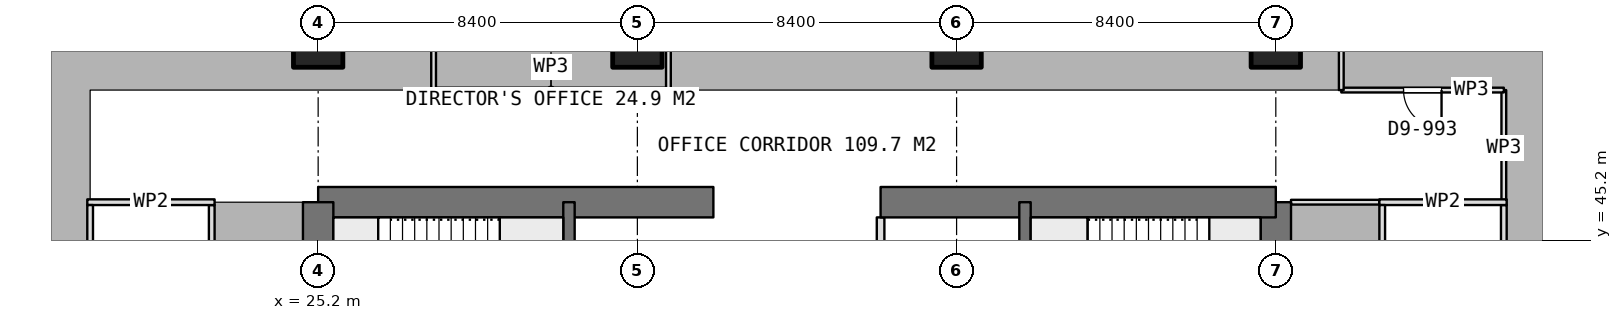
"""IFC4 building model, lengths in metres.
Left out: names, types, materials, properties, quantities, classifications, styles, units other than length and angle.
Written with IfcOpenShell. Run it as: python <this file> out.ifc"""

import sys

from ifc_helpers import new_model, si_unit, direction, frame, frame_2d, origin, origin_2d, place, context, subcontext, project, spatial, rectangle, extrude, element, fill, save


model = new_model("IFC4")
c1 = context("Model", 3, precision=1e-05, world=origin(), true_north=direction((0.0, 1.0)))
c2 = subcontext(c1, "Body", "Model", "MODEL_VIEW")
j1 = project(units=[si_unit("LENGTHUNIT", "METRE"), si_unit("PLANEANGLEUNIT", "RADIAN")], contexts=[c1])
p1 = place(None, origin())
s1 = spatial("IfcSite", under=j1, at=p1, CompositionType="ELEMENT")
p2 = place(p1, origin())
s2 = spatial("IfcBuilding", under=s1, at=p2, CompositionType="ELEMENT")
p3 = place(p2, frame((0.0, 0.0, 265.1)))
s3 = spatial("IfcBuildingStorey", under=s2, at=p3, CompositionType="ELEMENT", Elevation=265.1)
p4 = place(p3, frame((25.2, 46.2, 0.0), z_axis=(0.0, 0.0, 1.0), x_axis=(1.0, 0.0, 0.0)))
e1 = element("IfcWall", 1, at=p4, inside=s3, PredefinedType="SHEAR", context=c2, shape_type="SweptSolid", body=[
    extrude(rectangle(XDim=10.4, YDim=0.8, at=frame_2d((5.2, 0.0))), origin(), (0.0, 0.0, 1.0), 3.75),
])
p5 = place(p3, frame((40.0, 46.2, 0.0), z_axis=(0.0, 0.0, 1.0), x_axis=(1.0, 0.0, 0.0)))
e2 = element("IfcWall", 2, at=p5, inside=s3, PredefinedType="SHEAR", context=c2, shape_type="SweptSolid", body=[
    extrude(rectangle(XDim=10.4, YDim=0.8, at=frame_2d((5.2, 0.0))), origin(), (0.0, 0.0, 1.0), 3.75),
])
p6 = place(p3, frame((25.2, 21.0, 0.0), z_axis=(0.0, 0.0, 1.0), x_axis=(0.0, 1.0, 0.0)))
e3 = element("IfcWall", 3, at=p6, inside=s3, PredefinedType="SHEAR", context=c2, shape_type="SweptSolid", body=[
    extrude(rectangle(XDim=25.2, YDim=0.8, at=frame_2d((12.6, 0.0))), origin(), (0.0, 0.0, 1.0), 3.75),
])
p7 = place(p6, frame((7.8, 0.0, 0.0)))
e4 = element("IfcOpeningElement", 4, at=p7, cuts=e3, PredefinedType="OPENING", context=c2, shape_type="SweptSolid", body=[
    extrude(rectangle(XDim=1.2, YDim=2.1, at=frame_2d((0.6, 1.05))), frame((0.0, 0.41, 0.0), z_axis=(0.0, -1.0, 0.0), x_axis=(1.0, 0.0, 0.0)), (0.0, 0.0, 1.0), 0.82),
])
p8 = place(p6, frame((14.25, 0.0, 0.0)))
e5 = element("IfcOpeningElement", 5, at=p8, cuts=e3, PredefinedType="OPENING", context=c2, shape_type="SweptSolid", body=[
    extrude(rectangle(XDim=0.9, YDim=2.1, at=frame_2d((0.45, 1.05))), frame((0.0, 0.41, 0.0), z_axis=(0.0, -1.0, 0.0), x_axis=(1.0, 0.0, 0.0)), (0.0, 0.0, 1.0), 0.82),
])
p9 = place(p6, frame((16.85, 0.0, 0.0)))
e6 = element("IfcOpeningElement", 6, at=p9, cuts=e3, PredefinedType="OPENING", context=c2, shape_type="SweptSolid", body=[
    extrude(rectangle(XDim=0.9, YDim=2.1, at=frame_2d((0.45, 1.05))), frame((0.0, 0.41, 0.0), z_axis=(0.0, -1.0, 0.0), x_axis=(1.0, 0.0, 0.0)), (0.0, 0.0, 1.0), 0.82),
])
p10 = place(p6, frame((18.95, 0.0, 0.0)))
e7 = element("IfcOpeningElement", 7, at=p10, cuts=e3, PredefinedType="OPENING", context=c2, shape_type="SweptSolid", body=[
    extrude(rectangle(XDim=1.2, YDim=2.1, at=frame_2d((0.6, 1.05))), frame((0.0, 0.41, 0.0), z_axis=(0.0, -1.0, 0.0), x_axis=(1.0, 0.0, 0.0)), (0.0, 0.0, 1.0), 0.82),
])
p11 = place(p3, frame((50.4, 21.0, 0.0), z_axis=(0.0, 0.0, 1.0), x_axis=(0.0, 1.0, 0.0)))
e8 = element("IfcWall", 8, at=p11, inside=s3, PredefinedType="SHEAR", context=c2, shape_type="SweptSolid", body=[
    extrude(rectangle(XDim=25.2, YDim=0.8, at=frame_2d((12.6, 0.0))), origin(), (0.0, 0.0, 1.0), 3.75),
])
p12 = place(p11, frame((16.2, 0.0, 0.0)))
e9 = element("IfcOpeningElement", 9, at=p12, cuts=e8, PredefinedType="OPENING", context=c2, shape_type="SweptSolid", body=[
    extrude(rectangle(XDim=1.2, YDim=2.1, at=frame_2d((0.6, 1.05))), frame((0.0, 0.41, 0.0), z_axis=(0.0, -1.0, 0.0), x_axis=(1.0, 0.0, 0.0)), (0.0, 0.0, 1.0), 0.82),
])
p13 = place(p11, frame((10.05, 0.0, 0.0)))
e10 = element("IfcOpeningElement", 10, at=p13, cuts=e8, PredefinedType="OPENING", context=c2, shape_type="SweptSolid", body=[
    extrude(rectangle(XDim=0.9, YDim=2.1, at=frame_2d((0.45, 1.05))), frame((0.0, 0.41, 0.0), z_axis=(0.0, -1.0, 0.0), x_axis=(1.0, 0.0, 0.0)), (0.0, 0.0, 1.0), 0.82),
])
p14 = place(p11, frame((7.45, 0.0, 0.0)))
e11 = element("IfcOpeningElement", 11, at=p14, cuts=e8, PredefinedType="OPENING", context=c2, shape_type="SweptSolid", body=[
    extrude(rectangle(XDim=0.9, YDim=2.1, at=frame_2d((0.45, 1.05))), frame((0.0, 0.41, 0.0), z_axis=(0.0, -1.0, 0.0), x_axis=(1.0, 0.0, 0.0)), (0.0, 0.0, 1.0), 0.82),
])
p15 = place(p11, frame((0.6, 0.0, 0.0)))
e12 = element("IfcOpeningElement", 12, at=p15, cuts=e8, PredefinedType="OPENING", context=c2, shape_type="SweptSolid", body=[
    extrude(rectangle(XDim=1.2, YDim=2.1, at=frame_2d((0.6, 1.05))), frame((0.0, 0.41, 0.0), z_axis=(0.0, -1.0, 0.0), x_axis=(1.0, 0.0, 0.0)), (0.0, 0.0, 1.0), 0.82),
])
for number, where, z_axis, x_axis in (
    (13, (31.8, 21.0, 0.0), (0.0, 0.0, 1.0), (0.0, 1.0, 0.0)),
    (14, (43.8, 21.0, 0.0), (0.0, 0.0, 1.0), (0.0, 1.0, 0.0)),
):
    element("IfcWall", number, at=place(p3, frame(where, z_axis=z_axis, x_axis=x_axis)), inside=s3, PredefinedType="SHEAR", context=c2, shape_type="SweptSolid", body=[
        extrude(rectangle(XDim=25.2, YDim=0.3, at=frame_2d((12.6, 0.0))), origin(), (0.0, 0.0, 1.0), 3.75),
    ])
for number, where, z_axis, x_axis in (
    (15, (25.2, 50.4, 0.0), (0.0, 0.0, 1.0), (1.0, 0.0, 0.0)),
    (16, (33.6, 50.4, 0.0), (0.0, 0.0, 1.0), (1.0, 0.0, 0.0)),
    (17, (42.0, 50.4, 0.0), (0.0, 0.0, 1.0), (1.0, 0.0, 0.0)),
    (18, (50.4, 50.4, 0.0), (0.0, 0.0, 1.0), (1.0, 0.0, 0.0)),
):
    element("IfcColumn", number, at=place(p3, frame(where, z_axis=z_axis, x_axis=x_axis)), inside=s3, PredefinedType="COLUMN", context=c2, shape_type="SweptSolid", body=[
        extrude(rectangle(XDim=1.3, YDim=1.3, at=origin_2d()), origin(), (0.0, 0.0, 1.0), 3.75),
    ])
p16 = place(p3, frame((40.0, 41.55, 0.0), z_axis=(0.0, 0.0, 1.0), x_axis=(0.0, 1.0, 0.0)))
e19 = element("IfcWall", 19, at=p16, inside=s3, PredefinedType="PARTITIONING", context=c2, shape_type="SweptSolid", body=[
    extrude(rectangle(XDim=4.25, YDim=0.2, at=frame_2d((2.125, 0.0))), origin(), (0.0, 0.0, 1.0), 3.5),
])
p17 = place(p16, frame((1.8, 0.0, 0.0)))
e20 = element("IfcOpeningElement", 20, at=p17, cuts=e19, PredefinedType="OPENING", context=c2, shape_type="SweptSolid", body=[
    extrude(rectangle(XDim=0.9, YDim=2.1, at=frame_2d((0.45, 1.05))), frame((0.0, 0.11, 0.0), z_axis=(0.0, -1.0, 0.0), x_axis=(1.0, 0.0, 0.0)), (0.0, 0.0, 1.0), 0.22),
])
p18 = place(p3, frame((53.125, 46.2, 0.0), z_axis=(0.0, 0.0, 1.0), x_axis=(1.0, 0.0, 0.0)))
e21 = element("IfcWall", 21, at=p18, inside=s3, PredefinedType="PARTITIONING", context=c2, shape_type="SweptSolid", body=[
    extrude(rectangle(XDim=3.35, YDim=0.15, at=frame_2d((1.675, 0.0))), origin(), (0.0, 0.0, 1.0), 3.5),
])
p19 = place(p3, frame((53.2, 39.275, 0.0), z_axis=(0.0, 0.0, 1.0), x_axis=(0.0, 1.0, 0.0)))
e22 = element("IfcWall", 22, at=p19, inside=s3, PredefinedType="PARTITIONING", context=c2, shape_type="SweptSolid", body=[
    extrude(rectangle(XDim=6.85, YDim=0.15, at=frame_2d((3.425, 0.0))), origin(), (0.0, 0.0, 1.0), 3.5),
])
p20 = place(p19, frame((2.925, 0.0, 0.0)))
e23 = element("IfcOpeningElement", 23, at=p20, cuts=e22, PredefinedType="OPENING", context=c2, shape_type="SweptSolid", body=[
    extrude(rectangle(XDim=1.0, YDim=2.1, at=frame_2d((0.5, 1.05))), frame((0.0, 0.085, 0.0), z_axis=(0.0, -1.0, 0.0), x_axis=(1.0, 0.0, 0.0)), (0.0, 0.0, 1.0), 0.17),
])
p21 = place(p3, frame((56.4, 39.275, 0.0), z_axis=(0.0, 0.0, 1.0), x_axis=(0.0, 1.0, 0.0)))
e24 = element("IfcWall", 24, at=p21, inside=s3, PredefinedType="PARTITIONING", context=c2, shape_type="SweptSolid", body=[
    extrude(rectangle(XDim=6.85, YDim=0.15, at=frame_2d((3.425, 0.0))), origin(), (0.0, 0.0, 1.0), 3.5),
])
p22 = place(p3, frame((19.125, 46.2, 0.0), z_axis=(0.0, 0.0, 1.0), x_axis=(1.0, 0.0, 0.0)))
e25 = element("IfcWall", 25, at=p22, inside=s3, PredefinedType="PARTITIONING", context=c2, shape_type="SweptSolid", body=[
    extrude(rectangle(XDim=3.35, YDim=0.15, at=frame_2d((1.675, 0.0))), origin(), (0.0, 0.0, 1.0), 3.5),
])
p23 = place(p3, frame((19.2, 39.275, 0.0), z_axis=(0.0, 0.0, 1.0), x_axis=(0.0, 1.0, 0.0)))
e26 = element("IfcWall", 26, at=p23, inside=s3, PredefinedType="PARTITIONING", context=c2, shape_type="SweptSolid", body=[
    extrude(rectangle(XDim=6.85, YDim=0.15, at=frame_2d((3.425, 0.0))), origin(), (0.0, 0.0, 1.0), 3.5),
])
p24 = place(p3, frame((22.4, 39.275, 0.0), z_axis=(0.0, 0.0, 1.0), x_axis=(0.0, 1.0, 0.0)))
e27 = element("IfcWall", 27, at=p24, inside=s3, PredefinedType="PARTITIONING", context=c2, shape_type="SweptSolid", body=[
    extrude(rectangle(XDim=6.85, YDim=0.15, at=frame_2d((3.425, 0.0))), origin(), (0.0, 0.0, 1.0), 3.5),
])
p25 = place(p24, frame((2.925, 0.0, 0.0)))
e28 = element("IfcOpeningElement", 28, at=p25, cuts=e27, PredefinedType="OPENING", context=c2, shape_type="SweptSolid", body=[
    extrude(rectangle(XDim=1.0, YDim=2.1, at=frame_2d((0.5, 1.05))), frame((0.0, 0.085, 0.0), z_axis=(0.0, -1.0, 0.0), x_axis=(1.0, 0.0, 0.0)), (0.0, 0.0, 1.0), 0.17),
])
p26 = place(p3, frame((50.8, 46.2, 0.0), z_axis=(0.0, 0.0, 1.0), x_axis=(1.0, 0.0, 0.0)))
e29 = element("IfcWall", 29, at=p26, inside=s3, PredefinedType="PARTITIONING", context=c2, shape_type="SweptSolid", body=[
    extrude(rectangle(XDim=2.324, YDim=0.125, at=frame_2d((1.162, 0.0))), origin(), (0.0, 0.0, 1.0), 3.5),
])
p27 = place(p3, frame((56.4, 46.125, 0.0), z_axis=(0.0, 0.0, 1.0), x_axis=(0.0, 1.0, 0.0)))
e30 = element("IfcWall", 30, at=p27, inside=s3, PredefinedType="PARTITIONING", context=c2, shape_type="SweptSolid", body=[
    extrude(rectangle(XDim=3.025, YDim=0.125, at=frame_2d((1.512, 0.0))), origin(), (0.0, 0.0, 1.0), 3.5),
])
p28 = place(p3, frame((56.4, 49.15, 0.0), z_axis=(0.0, 0.0, 1.0), x_axis=(-1.0, 0.0, 0.0)))
e31 = element("IfcWall", 31, at=p28, inside=s3, PredefinedType="PARTITIONING", context=c2, shape_type="SweptSolid", body=[
    extrude(rectangle(XDim=4.277, YDim=0.125, at=frame_2d((2.138, 0.0))), origin(), (0.0, 0.0, 1.0), 3.5),
])
p29 = place(p28, frame((1.639, 0.0, 0.0)))
e32 = element("IfcOpeningElement", 32, at=p29, cuts=e31, PredefinedType="OPENING", context=c2, shape_type="SweptSolid", body=[
    extrude(rectangle(XDim=1.0, YDim=2.1, at=frame_2d((0.5, 1.05))), frame((0.0, 0.073, 0.0), z_axis=(0.0, -1.0, 0.0), x_axis=(1.0, 0.0, 0.0)), (0.0, 0.0, 1.0), 0.145),
])
p30 = place(p3, frame((52.123, 49.15, 0.0), z_axis=(0.0, 0.0, 1.0), x_axis=(0.0, 1.0, 0.0)))
e33 = element("IfcWall", 33, at=p30, inside=s3, PredefinedType="PARTITIONING", context=c2, shape_type="SweptSolid", body=[
    extrude(rectangle(XDim=2.852, YDim=0.125, at=frame_2d((1.426, 0.0))), origin(), (0.0, 0.0, 1.0), 3.5),
])
p31 = place(p3, frame((34.417, 52.943, 0.0), z_axis=(0.0, 0.0, 1.0), x_axis=(0.0, -1.0, 0.0)))
e34 = element("IfcWall", 34, at=p31, inside=s3, PredefinedType="PARTITIONING", context=c2, shape_type="SweptSolid", body=[
    extrude(rectangle(XDim=3.793, YDim=0.125, at=frame_2d((1.896, 0.0))), origin(), (0.0, 0.0, 1.0), 3.5),
])
p32 = place(p31, frame((0.796, 0.0, 0.0)))
e35 = element("IfcOpeningElement", 35, at=p32, cuts=e34, PredefinedType="OPENING", context=c2, shape_type="SweptSolid", body=[
    extrude(rectangle(XDim=1.0, YDim=2.1, at=frame_2d((0.5, 1.05))), frame((0.0, 0.073, 0.0), z_axis=(0.0, -1.0, 0.0), x_axis=(1.0, 0.0, 0.0)), (0.0, 0.0, 1.0), 0.145),
])
p33 = place(p3, frame((34.417, 49.15, 0.0), z_axis=(0.0, 0.0, 1.0), x_axis=(-1.0, 0.0, 0.0)))
e36 = element("IfcWall", 36, at=p33, inside=s3, PredefinedType="PARTITIONING", context=c2, shape_type="SweptSolid", body=[
    extrude(rectangle(XDim=6.179, YDim=0.125, at=frame_2d((3.089, 0.0))), origin(), (0.0, 0.0, 1.0), 3.5),
])
p34 = place(p3, frame((28.238, 49.15, 0.0), z_axis=(0.0, 0.0, 1.0), x_axis=(0.0, 1.0, 0.0)))
e37 = element("IfcWall", 37, at=p34, inside=s3, PredefinedType="PARTITIONING", context=c2, shape_type="SweptSolid", body=[
    extrude(rectangle(XDim=4.117, YDim=0.125, at=frame_2d((2.059, 0.0))), origin(), (0.0, 0.0, 1.0), 3.5),
])
p35 = place(p29, origin())
e38 = element("IfcDoor", 38, at=p35, inside=s3, OperationType="SINGLE_SWING_LEFT", PredefinedType="DOOR", context=c2, shape_type="SweptSolid", body=[
    extrude(rectangle(XDim=1.0, YDim=2.1, at=frame_2d((0.5, 1.05))), frame((0.0, 0.025, 0.0), z_axis=(0.0, -1.0, 0.0), x_axis=(1.0, 0.0, 0.0)), (0.0, 0.0, 1.0), 0.05),
])
fill(e32, e38)
save(model, sys.argv[1])
